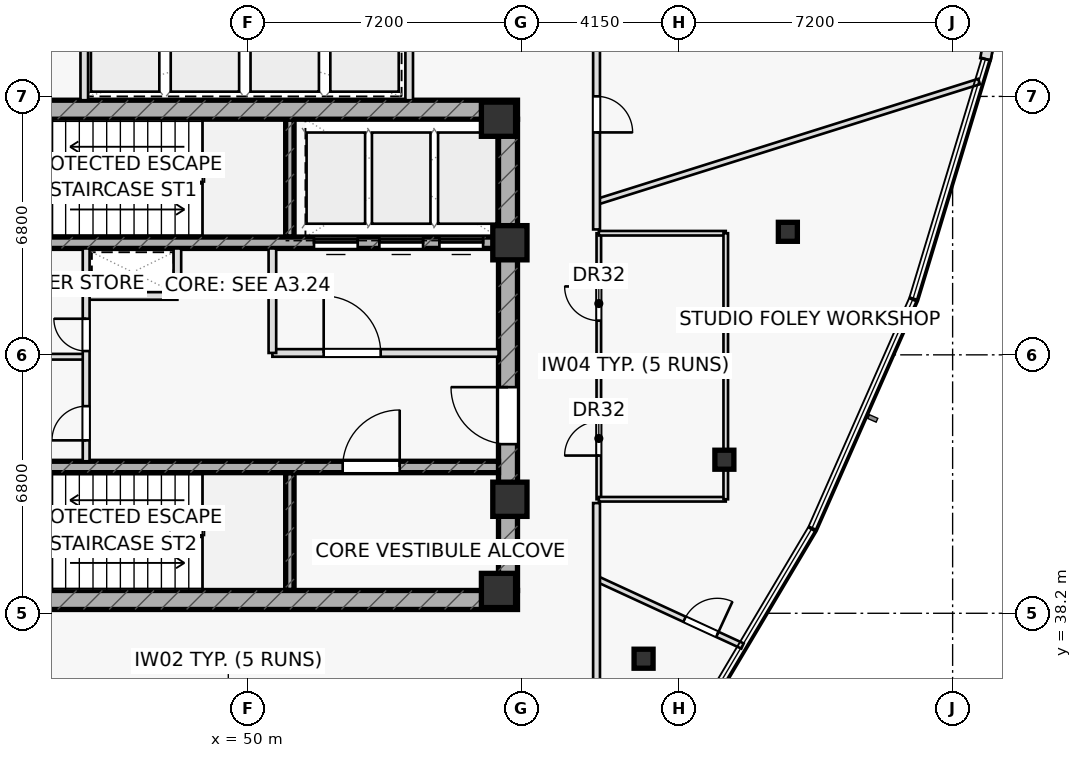
"""IFC4 building model, lengths in metres.
Left out: names, types, materials, properties, quantities, classifications, styles, units other than length and angle.
Written with IfcOpenShell. Run it as: python <this file> out.ifc"""

import sys

from ifc_helpers import new_model, si_unit, direction, frame, frame_2d, origin, origin_2d, place, context, subcontext, project, spatial, rectangle, hollow_rectangle, extrude, element, fill, save


model = new_model("IFC4")
c1 = context("Model", 3, precision=1e-05, world=origin(), true_north=direction((0.0, 1.0)))
c2 = subcontext(c1, "Body", "Model", "MODEL_VIEW")
j1 = project(units=[si_unit("LENGTHUNIT", "METRE"), si_unit("PLANEANGLEUNIT", "RADIAN")], contexts=[c1])
p1 = place(None, origin())
s1 = spatial("IfcSite", under=j1, at=p1, CompositionType="ELEMENT")
p2 = place(p1, origin())
s2 = spatial("IfcBuilding", under=s1, at=p2, CompositionType="ELEMENT")
p3 = place(p2, frame((0.0, 0.0, 277.5)))
s3 = spatial("IfcBuildingStorey", under=s2, at=p3, CompositionType="ELEMENT", Elevation=277.5)
for number, where, z_axis, x_axis in (
    (1, (51.11, 48.1, 0.0), (0.0, 0.0, 1.0), (0.0, 1.0, 0.0)),
    (2, (51.11, 38.8, 0.0), (0.0, 0.0, 1.0), (0.0, 1.0, 0.0)),
):
    element("IfcWall", number, at=place(p3, frame(where, z_axis=z_axis, x_axis=x_axis)), inside=s3, PredefinedType="SHEAR", context=c2, shape_type="SweptSolid", body=[
        extrude(rectangle(XDim=3.1, YDim=0.22, at=frame_2d((1.55, 0.0))), origin(), (0.0, 0.0, 1.0), 3.7),
    ])
p4 = place(p3, frame((42.9, 51.45, 0.0), z_axis=(0.0, 0.0, 1.0), x_axis=(1.0, 0.0, 0.0)))
e3 = element("IfcWall", 3, at=p4, inside=s3, PredefinedType="SHEAR", context=c2, shape_type="SweptSolid", body=[
    extrude(rectangle(XDim=14.2, YDim=0.5, at=frame_2d((7.1, 0.0))), origin(), (0.0, 0.0, 1.0), 3.7),
])
p5 = place(p4, frame((0.78, 0.0, 0.0)))
e4 = element("IfcOpeningElement", 4, at=p5, cuts=e3, PredefinedType="OPENING", context=c2, shape_type="SweptSolid", body=[
    extrude(rectangle(XDim=1.05, YDim=2.2, at=frame_2d((0.525, 1.1))), frame((0.0, 0.26, 0.0), z_axis=(0.0, -1.0, 0.0), x_axis=(1.0, 0.0, 0.0)), (0.0, 0.0, 1.0), 0.52),
])
p6 = place(p3, frame((42.9, 38.55, 0.0), z_axis=(0.0, 0.0, 1.0), x_axis=(1.0, 0.0, 0.0)))
e5 = element("IfcWall", 5, at=p6, inside=s3, PredefinedType="SHEAR", context=c2, shape_type="SweptSolid", body=[
    extrude(rectangle(XDim=14.2, YDim=0.5, at=frame_2d((7.1, 0.0))), origin(), (0.0, 0.0, 1.0), 3.7),
])
p7 = place(p6, frame((0.78, 0.0, 0.0)))
e6 = element("IfcOpeningElement", 6, at=p7, cuts=e5, PredefinedType="OPENING", context=c2, shape_type="SweptSolid", body=[
    extrude(rectangle(XDim=1.05, YDim=2.2, at=frame_2d((0.525, 1.1))), frame((0.0, 0.26, 0.0), z_axis=(0.0, -1.0, 0.0), x_axis=(1.0, 0.0, 0.0)), (0.0, 0.0, 1.0), 0.52),
])
p8 = place(p3, frame((56.85, 38.8, 0.0), z_axis=(0.0, 0.0, 1.0), x_axis=(0.0, 1.0, 0.0)))
e7 = element("IfcWall", 7, at=p8, inside=s3, PredefinedType="SHEAR", context=c2, shape_type="SweptSolid", body=[
    extrude(rectangle(XDim=12.4, YDim=0.5, at=frame_2d((6.2, 0.0))), origin(), (0.0, 0.0, 1.0), 3.7),
])
p9 = place(p8, frame((3.85, 0.0, 0.0)))
e8 = element("IfcOpeningElement", 8, at=p9, cuts=e7, PredefinedType="OPENING", context=c2, shape_type="SweptSolid", body=[
    extrude(rectangle(XDim=1.5, YDim=2.2, at=frame_2d((0.75, 1.1))), frame((0.0, 0.26, 0.0), z_axis=(0.0, -1.0, 0.0), x_axis=(1.0, 0.0, 0.0)), (0.0, 0.0, 1.0), 0.52),
])
p10 = place(p3, frame((43.4, 47.95, 0.0), z_axis=(0.0, 0.0, 1.0), x_axis=(1.0, 0.0, 0.0)))
e9 = element("IfcWall", 9, at=p10, inside=s3, PredefinedType="SHEAR", context=c2, shape_type="SweptSolid", body=[
    extrude(rectangle(XDim=13.2, YDim=0.3, at=frame_2d((6.6, 0.0))), origin(), (0.0, 0.0, 1.0), 3.7),
])
p11 = place(p10, frame((8.345, 0.0, 0.0)))
e10 = element("IfcOpeningElement", 10, at=p11, cuts=e9, PredefinedType="OPENING", context=c2, shape_type="SweptSolid", body=[
    extrude(rectangle(XDim=1.15, YDim=2.2, at=frame_2d((0.575, 1.1))), frame((0.0, 0.16, 0.0), z_axis=(0.0, -1.0, 0.0), x_axis=(1.0, 0.0, 0.0)), (0.0, 0.0, 1.0), 0.32),
])
p12 = place(p10, frame((10.065, 0.0, 0.0)))
e11 = element("IfcOpeningElement", 11, at=p12, cuts=e9, PredefinedType="OPENING", context=c2, shape_type="SweptSolid", body=[
    extrude(rectangle(XDim=1.15, YDim=2.2, at=frame_2d((0.575, 1.1))), frame((0.0, 0.16, 0.0), z_axis=(0.0, -1.0, 0.0), x_axis=(1.0, 0.0, 0.0)), (0.0, 0.0, 1.0), 0.32),
])
p13 = place(p10, frame((11.645, 0.0, 0.0)))
e12 = element("IfcOpeningElement", 12, at=p13, cuts=e9, PredefinedType="OPENING", context=c2, shape_type="SweptSolid", body=[
    extrude(rectangle(XDim=1.15, YDim=2.2, at=frame_2d((0.575, 1.1))), frame((0.0, 0.16, 0.0), z_axis=(0.0, -1.0, 0.0), x_axis=(1.0, 0.0, 0.0)), (0.0, 0.0, 1.0), 0.32),
])
p14 = place(p3, frame((43.4, 42.05, 0.0), z_axis=(0.0, 0.0, 1.0), x_axis=(1.0, 0.0, 0.0)))
e13 = element("IfcWall", 13, at=p14, inside=s3, PredefinedType="SHEAR", context=c2, shape_type="SweptSolid", body=[
    extrude(rectangle(XDim=13.2, YDim=0.3, at=frame_2d((6.6, 0.0))), origin(), (0.0, 0.0, 1.0), 3.7),
])
p15 = place(p14, frame((9.1, 0.0, 0.0)))
e14 = element("IfcOpeningElement", 14, at=p15, cuts=e13, PredefinedType="OPENING", context=c2, shape_type="SweptSolid", body=[
    extrude(rectangle(XDim=1.5, YDim=2.2, at=frame_2d((0.75, 1.1))), frame((0.0, 0.16, 0.0), z_axis=(0.0, -1.0, 0.0), x_axis=(1.0, 0.0, 0.0)), (0.0, 0.0, 1.0), 0.32),
])
for number, where, z_axis, x_axis in (
    (15, (56.9, 47.95, 0.0), (0.0, 0.0, 1.0), (1.0, 0.0, 0.0)),
    (16, (56.6, 51.2, 0.0), (0.0, 0.0, 1.0), (1.0, 0.0, 0.0)),
    (17, (56.9, 41.2, 0.0), (0.0, 0.0, 1.0), (1.0, 0.0, 0.0)),
    (18, (56.6, 38.8, 0.0), (0.0, 0.0, 1.0), (1.0, 0.0, 0.0)),
):
    element("IfcColumn", number, at=place(p3, frame(where, z_axis=z_axis, x_axis=x_axis)), inside=s3, PredefinedType="COLUMN", context=c2, shape_type="SweptSolid", body=[
        extrude(rectangle(XDim=0.9, YDim=0.9, at=origin_2d()), origin(), (0.0, 0.0, 1.0), 3.7),
    ])
for number, where, z_axis, x_axis in (
    (19, (60.417, 37.004, 0.0), (0.0, 0.0, 1.0), (1.0, 0.0, 0.0)),
    (20, (62.544, 42.24, 0.0), (0.0, 0.0, 1.0), (1.0, 0.0, 0.0)),
    (21, (64.214, 48.237, 0.0), (0.0, 0.0, 1.0), (1.0, 0.0, 0.0)),
):
    element("IfcColumn", number, at=place(p3, frame(where, z_axis=z_axis, x_axis=x_axis)), inside=s3, PredefinedType="COLUMN", context=c2, shape_type="SweptSolid", body=[
        extrude(hollow_rectangle(XDim=0.5, YDim=0.5, WallThickness=0.03, at=origin_2d()), origin(), (0.0, 0.0, 1.0), 3.7),
    ])
for number, where, z_axis, x_axis in (
    (22, (45.7, 51.7, 0.0), (0.0, 0.0, 1.0), (0.0, 1.0, 0.0)),
    (23, (54.25, 51.7, 0.0), (0.0, 0.0, 1.0), (0.0, 1.0, 0.0)),
):
    element("IfcWall", number, at=place(p3, frame(where, z_axis=z_axis, x_axis=x_axis)), inside=s3, PredefinedType="PARTITIONING", context=c2, shape_type="SweptSolid", body=[
        extrude(rectangle(XDim=2.6, YDim=0.2, at=frame_2d((1.3, 0.0))), origin(), (0.0, 0.0, 1.0), 3.7),
    ])
p16 = place(p3, frame((45.75, 46.55, 0.0), z_axis=(0.0, 0.0, 1.0), x_axis=(1.0, 0.0, 0.0)))
e24 = element("IfcWall", 24, at=p16, inside=s3, PredefinedType="PARTITIONING", context=c2, shape_type="SweptSolid", body=[
    extrude(rectangle(XDim=2.4, YDim=0.2, at=frame_2d((1.2, 0.0))), origin(), (0.0, 0.0, 1.0), 3.7),
])
p17 = place(p3, frame((48.15, 46.55, 0.0), z_axis=(0.0, 0.0, 1.0), x_axis=(0.0, 1.0, 0.0)))
e25 = element("IfcWall", 25, at=p17, inside=s3, PredefinedType="PARTITIONING", context=c2, shape_type="SweptSolid", body=[
    extrude(rectangle(XDim=1.25, YDim=0.2, at=frame_2d((0.625, 0.0))), origin(), (0.0, 0.0, 1.0), 3.7),
])
p18 = place(p3, frame((50.65, 45.05, 0.0), z_axis=(0.0, 0.0, 1.0), x_axis=(1.0, 0.0, 0.0)))
e26 = element("IfcWall", 26, at=p18, inside=s3, PredefinedType="PARTITIONING", context=c2, shape_type="SweptSolid", body=[
    extrude(rectangle(XDim=5.95, YDim=0.2, at=frame_2d((2.975, 0.0))), origin(), (0.0, 0.0, 1.0), 3.7),
])
p19 = place(p18, frame((1.35, 0.0, 0.0)))
e27 = element("IfcOpeningElement", 27, at=p19, cuts=e26, PredefinedType="OPENING", context=c2, shape_type="SweptSolid", body=[
    extrude(rectangle(XDim=1.5, YDim=2.2, at=frame_2d((0.75, 1.1))), frame((0.0, 0.11, 0.0), z_axis=(0.0, -1.0, 0.0), x_axis=(1.0, 0.0, 0.0)), (0.0, 0.0, 1.0), 0.22),
])
p20 = place(p3, frame((50.65, 45.05, 0.0), z_axis=(0.0, 0.0, 1.0), x_axis=(0.0, 1.0, 0.0)))
e28 = element("IfcWall", 28, at=p20, inside=s3, PredefinedType="PARTITIONING", context=c2, shape_type="SweptSolid", body=[
    extrude(rectangle(XDim=2.75, YDim=0.2, at=frame_2d((1.375, 0.0))), origin(), (0.0, 0.0, 1.0), 3.7),
])
p21 = place(p3, frame((43.4, 44.95, 0.0), z_axis=(0.0, 0.0, 1.0), x_axis=(1.0, 0.0, 0.0)))
e29 = element("IfcWall", 29, at=p21, inside=s3, PredefinedType="PARTITIONING", context=c2, shape_type="SweptSolid", body=[
    extrude(rectangle(XDim=2.35, YDim=0.15, at=frame_2d((1.175, 0.0))), origin(), (0.0, 0.0, 1.0), 3.7),
])
p22 = place(p3, frame((45.75, 42.2, 0.0), z_axis=(0.0, 0.0, 1.0), x_axis=(0.0, 1.0, 0.0)))
e30 = element("IfcWall", 30, at=p22, inside=s3, PredefinedType="PARTITIONING", context=c2, shape_type="SweptSolid", body=[
    extrude(rectangle(XDim=5.6, YDim=0.18, at=frame_2d((2.8, 0.0))), origin(), (0.0, 0.0, 1.0), 3.7),
])
p23 = place(p22, frame((0.55, 0.0, 0.0)))
e31 = element("IfcOpeningElement", 31, at=p23, cuts=e30, PredefinedType="OPENING", context=c2, shape_type="SweptSolid", body=[
    extrude(rectangle(XDim=0.9, YDim=2.05, at=frame_2d((0.45, 1.025))), frame((0.0, 0.1, 0.0), z_axis=(0.0, -1.0, 0.0), x_axis=(1.0, 0.0, 0.0)), (0.0, 0.0, 1.0), 0.2),
])
p24 = place(p22, frame((2.9, 0.0, 0.0)))
e32 = element("IfcOpeningElement", 32, at=p24, cuts=e30, PredefinedType="OPENING", context=c2, shape_type="SweptSolid", body=[
    extrude(rectangle(XDim=0.85, YDim=2.05, at=frame_2d((0.425, 1.025))), frame((0.0, 0.1, 0.0), z_axis=(0.0, -1.0, 0.0), x_axis=(1.0, 0.0, 0.0)), (0.0, 0.0, 1.0), 0.2),
])
p25 = place(p3, frame((59.24, 41.2, 0.0), z_axis=(0.0, 0.0, 1.0), x_axis=(0.0, 1.0, 0.0)))
e33 = element("IfcWall", 33, at=p25, inside=s3, PredefinedType="PARTITIONING", context=c2, shape_type="SweptSolid", body=[
    extrude(rectangle(XDim=7.0, YDim=0.12, at=frame_2d((3.5, 0.0))), origin(), (0.0, 0.0, 1.0), 3.7),
])
p26 = place(p25, frame((1.15, 0.0, 0.0)))
e34 = element("IfcOpeningElement", 34, at=p26, cuts=e33, PredefinedType="OPENING", context=c2, shape_type="SweptSolid", body=[
    extrude(rectangle(XDim=0.9, YDim=2.05, at=frame_2d((0.45, 1.025))), frame((0.0, 0.07, 0.0), z_axis=(0.0, -1.0, 0.0), x_axis=(1.0, 0.0, 0.0)), (0.0, 0.0, 1.0), 0.14),
])
p27 = place(p25, frame((4.7, 0.0, 0.0)))
e35 = element("IfcOpeningElement", 35, at=p27, cuts=e33, PredefinedType="OPENING", context=c2, shape_type="SweptSolid", body=[
    extrude(rectangle(XDim=0.9, YDim=2.05, at=frame_2d((0.45, 1.025))), frame((0.0, 0.07, 0.0), z_axis=(0.0, -1.0, 0.0), x_axis=(1.0, 0.0, 0.0)), (0.0, 0.0, 1.0), 0.14),
])
p28 = place(p3, frame((59.24, 41.2, 0.0), z_axis=(0.0, 0.0, 1.0), x_axis=(1.0, 0.0, 0.0)))
e36 = element("IfcWall", 36, at=p28, inside=s3, PredefinedType="PARTITIONING", context=c2, shape_type="SweptSolid", body=[
    extrude(rectangle(XDim=3.34, YDim=0.12, at=frame_2d((1.67, 0.0))), origin(), (0.0, 0.0, 1.0), 3.175),
])
for number, where, z_axis, x_axis in (
    (37, (59.24, 44.65, 0.0), (0.0, 0.0, 1.0), (1.0, 0.0, 0.0)),
    (38, (59.24, 48.2, 0.0), (0.0, 0.0, 1.0), (1.0, 0.0, 0.0)),
):
    element("IfcWall", number, at=place(p3, frame(where, z_axis=z_axis, x_axis=x_axis)), inside=s3, PredefinedType="PARTITIONING", context=c2, shape_type="SweptSolid", body=[
        extrude(rectangle(XDim=3.34, YDim=0.12, at=frame_2d((1.67, 0.0))), origin(), (0.0, 0.0, 1.0), 3.7),
    ])
p29 = place(p3, frame((62.58, 41.2, 0.0), z_axis=(0.0, 0.0, 1.0), x_axis=(0.0, 1.0, 0.0)))
e39 = element("IfcWall", 39, at=p29, inside=s3, PredefinedType="PARTITIONING", context=c2, shape_type="SweptSolid", body=[
    extrude(rectangle(XDim=7.0, YDim=0.12, at=frame_2d((3.5, 0.0))), origin(), (0.0, 0.0, 1.0), 3.235),
])
p30 = place(p3, frame((59.18, 39.11, 0.0), z_axis=(0.0, 0.0, 1.0), x_axis=(0.908177220168, -0.418585877411, 0.0)))
e40 = element("IfcWall", 40, at=p30, inside=s3, PredefinedType="PARTITIONING", context=c2, shape_type="SweptSolid", body=[
    extrude(rectangle(XDim=4.229, YDim=0.15, at=frame_2d((2.115, 0.0))), origin(), (0.0, 0.0, 1.0), 3.235),
])
p31 = place(p30, frame((2.55, 0.0, 0.0)))
e41 = element("IfcOpeningElement", 41, at=p31, cuts=e40, PredefinedType="OPENING", context=c2, shape_type="SweptSolid", body=[
    extrude(rectangle(XDim=0.95, YDim=2.05, at=frame_2d((0.475, 1.025))), frame((0.0, 0.085, 0.0), z_axis=(0.0, -1.0, 0.0), x_axis=(1.0, 0.0, 0.0)), (0.0, 0.0, 1.0), 0.17),
])
p32 = place(p3, frame((59.18, 49.023, 0.0), z_axis=(0.0, 0.0, 1.0), x_axis=(0.953860906962, 0.300248847075, 0.0)))
e42 = element("IfcWall", 42, at=p32, inside=s3, PredefinedType="PARTITIONING", context=c2, shape_type="SweptSolid", body=[
    extrude(rectangle(XDim=10.553, YDim=0.15, at=frame_2d((5.277, 0.0))), origin(), (0.0, 0.0, 1.0), 3.175),
])
p33 = place(p3, frame((59.18, 53.83, 0.0), z_axis=(0.0, 0.0, 1.0), x_axis=(0.0, -1.0, 0.0)))
e43 = element("IfcWall", 43, at=p33, inside=s3, PredefinedType="PARTITIONING", context=c2, shape_type="SweptSolid", body=[
    extrude(rectangle(XDim=5.53, YDim=0.18, at=frame_2d((2.765, 0.0))), origin(), (0.0, 0.0, 1.0), 3.7),
])
p34 = place(p33, frame((2.028, 0.0, 0.0)))
e44 = element("IfcOpeningElement", 44, at=p34, cuts=e43, PredefinedType="OPENING", context=c2, shape_type="SweptSolid", body=[
    extrude(rectangle(XDim=0.95, YDim=2.05, at=frame_2d((0.475, 1.025))), frame((0.0, 0.1, 0.0), z_axis=(0.0, -1.0, 0.0), x_axis=(1.0, 0.0, 0.0)), (0.0, 0.0, 1.0), 0.2),
])
p35 = place(p3, frame((59.18, 41.1, 0.0), z_axis=(0.0, 0.0, 1.0), x_axis=(0.0, -1.0, 0.0)))
e45 = element("IfcWall", 45, at=p35, inside=s3, PredefinedType="PARTITIONING", context=c2, shape_type="SweptSolid", body=[
    extrude(rectangle(XDim=4.93, YDim=0.18, at=frame_2d((2.465, 0.0))), origin(), (0.0, 0.0, 1.0), 3.435),
])
p36 = place(p3, frame((69.415, 52.781, 0.0), z_axis=(0.0, 0.0, 1.0), x_axis=(0.184717139084, 0.982791726933, 0.0)))
e46 = element("IfcWall", 46, at=p36, inside=s3, PredefinedType="STANDARD", context=c2, shape_type="SweptSolid", body=[
    extrude(rectangle(XDim=1.719, YDim=0.28, at=frame_2d((0.86, 0.0))), origin(), (0.0, 0.0, 1.0), 3.7),
])
p37 = place(p9, origin())
e47 = element("IfcDoor", 47, at=p37, inside=s3, OperationType="SINGLE_SWING_RIGHT", PredefinedType="DOOR", context=c2, shape_type="SweptSolid", body=[
    extrude(rectangle(XDim=1.5, YDim=2.2, at=frame_2d((0.75, 1.1))), frame((0.0, 0.025, 0.0), z_axis=(0.0, -1.0, 0.0), x_axis=(1.0, 0.0, 0.0)), (0.0, 0.0, 1.0), 0.05),
])
fill(e8, e47)
p38 = place(p19, origin())
e48 = element("IfcDoor", 48, at=p38, inside=s3, OperationType="SINGLE_SWING_LEFT", PredefinedType="DOOR", context=c2, shape_type="SweptSolid", body=[
    extrude(rectangle(XDim=1.5, YDim=2.2, at=frame_2d((0.75, 1.1))), frame((0.0, 0.025, 0.0), z_axis=(0.0, -1.0, 0.0), x_axis=(1.0, 0.0, 0.0)), (0.0, 0.0, 1.0), 0.05),
])
fill(e27, e48)
p39 = place(p15, origin())
e49 = element("IfcDoor", 49, at=p39, inside=s3, OperationType="SINGLE_SWING_RIGHT", PredefinedType="DOOR", context=c2, shape_type="SweptSolid", body=[
    extrude(rectangle(XDim=1.5, YDim=2.2, at=frame_2d((0.75, 1.1))), frame((0.0, 0.025, 0.0), z_axis=(0.0, -1.0, 0.0), x_axis=(1.0, 0.0, 0.0)), (0.0, 0.0, 1.0), 0.05),
])
fill(e14, e49)
p40 = place(p23, origin())
e50 = element("IfcDoor", 50, at=p40, inside=s3, OperationType="SINGLE_SWING_LEFT", PredefinedType="DOOR", context=c2, shape_type="SweptSolid", body=[
    extrude(rectangle(XDim=0.9, YDim=2.05, at=frame_2d((0.45, 1.025))), frame((0.0, 0.025, 0.0), z_axis=(0.0, -1.0, 0.0), x_axis=(1.0, 0.0, 0.0)), (0.0, 0.0, 1.0), 0.05),
])
fill(e31, e50)
p41 = place(p24, origin())
e51 = element("IfcDoor", 51, at=p41, inside=s3, OperationType="SINGLE_SWING_RIGHT", PredefinedType="DOOR", context=c2, shape_type="SweptSolid", body=[
    extrude(rectangle(XDim=0.85, YDim=2.05, at=frame_2d((0.425, 1.025))), frame((0.0, 0.025, 0.0), z_axis=(0.0, -1.0, 0.0), x_axis=(1.0, 0.0, 0.0)), (0.0, 0.0, 1.0), 0.05),
])
fill(e32, e51)
p42 = place(p26, origin())
e52 = element("IfcDoor", 52, at=p42, inside=s3, OperationType="SINGLE_SWING_LEFT", PredefinedType="DOOR", context=c2, shape_type="SweptSolid", body=[
    extrude(rectangle(XDim=0.9, YDim=2.05, at=frame_2d((0.45, 1.025))), frame((0.0, 0.025, 0.0), z_axis=(0.0, -1.0, 0.0), x_axis=(1.0, 0.0, 0.0)), (0.0, 0.0, 1.0), 0.05),
])
fill(e34, e52)
p43 = place(p27, origin())
e53 = element("IfcDoor", 53, at=p43, inside=s3, OperationType="SINGLE_SWING_RIGHT", PredefinedType="DOOR", context=c2, shape_type="SweptSolid", body=[
    extrude(rectangle(XDim=0.9, YDim=2.05, at=frame_2d((0.45, 1.025))), frame((0.0, 0.025, 0.0), z_axis=(0.0, -1.0, 0.0), x_axis=(1.0, 0.0, 0.0)), (0.0, 0.0, 1.0), 0.05),
])
fill(e35, e53)
p44 = place(p31, origin())
e54 = element("IfcDoor", 54, at=p44, inside=s3, OperationType="SINGLE_SWING_RIGHT", PredefinedType="DOOR", context=c2, shape_type="SweptSolid", body=[
    extrude(rectangle(XDim=0.95, YDim=2.05, at=frame_2d((0.475, 1.025))), frame((0.0, 0.025, 0.0), z_axis=(0.0, -1.0, 0.0), x_axis=(1.0, 0.0, 0.0)), (0.0, 0.0, 1.0), 0.05),
])
fill(e41, e54)
p45 = place(p34, origin())
e55 = element("IfcDoor", 55, at=p45, inside=s3, OperationType="SINGLE_SWING_RIGHT", PredefinedType="DOOR", context=c2, shape_type="SweptSolid", body=[
    extrude(rectangle(XDim=0.95, YDim=2.05, at=frame_2d((0.475, 1.025))), frame((0.0, 0.025, 0.0), z_axis=(0.0, -1.0, 0.0), x_axis=(1.0, 0.0, 0.0)), (0.0, 0.0, 1.0), 0.05),
])
fill(e44, e55)
p46 = place(p11, origin())
e56 = element("IfcDoor", 56, at=p46, inside=s3, OperationType="SLIDING_TO_LEFT", PredefinedType="DOOR", context=c2, shape_type="SweptSolid", body=[
    extrude(rectangle(XDim=1.15, YDim=2.2, at=frame_2d((0.575, 1.1))), frame((0.0, 0.025, 0.0), z_axis=(0.0, -1.0, 0.0), x_axis=(1.0, 0.0, 0.0)), (0.0, 0.0, 1.0), 0.05),
])
fill(e10, e56)
p47 = place(p12, origin())
e57 = element("IfcDoor", 57, at=p47, inside=s3, OperationType="SLIDING_TO_LEFT", PredefinedType="DOOR", context=c2, shape_type="SweptSolid", body=[
    extrude(rectangle(XDim=1.15, YDim=2.2, at=frame_2d((0.575, 1.1))), frame((0.0, 0.025, 0.0), z_axis=(0.0, -1.0, 0.0), x_axis=(1.0, 0.0, 0.0)), (0.0, 0.0, 1.0), 0.05),
])
fill(e11, e57)
p48 = place(p13, origin())
e58 = element("IfcDoor", 58, at=p48, inside=s3, OperationType="SLIDING_TO_LEFT", PredefinedType="DOOR", context=c2, shape_type="SweptSolid", body=[
    extrude(rectangle(XDim=1.15, YDim=2.2, at=frame_2d((0.575, 1.1))), frame((0.0, 0.025, 0.0), z_axis=(0.0, -1.0, 0.0), x_axis=(1.0, 0.0, 0.0)), (0.0, 0.0, 1.0), 0.05),
])
fill(e12, e58)
save(model, sys.argv[1])
